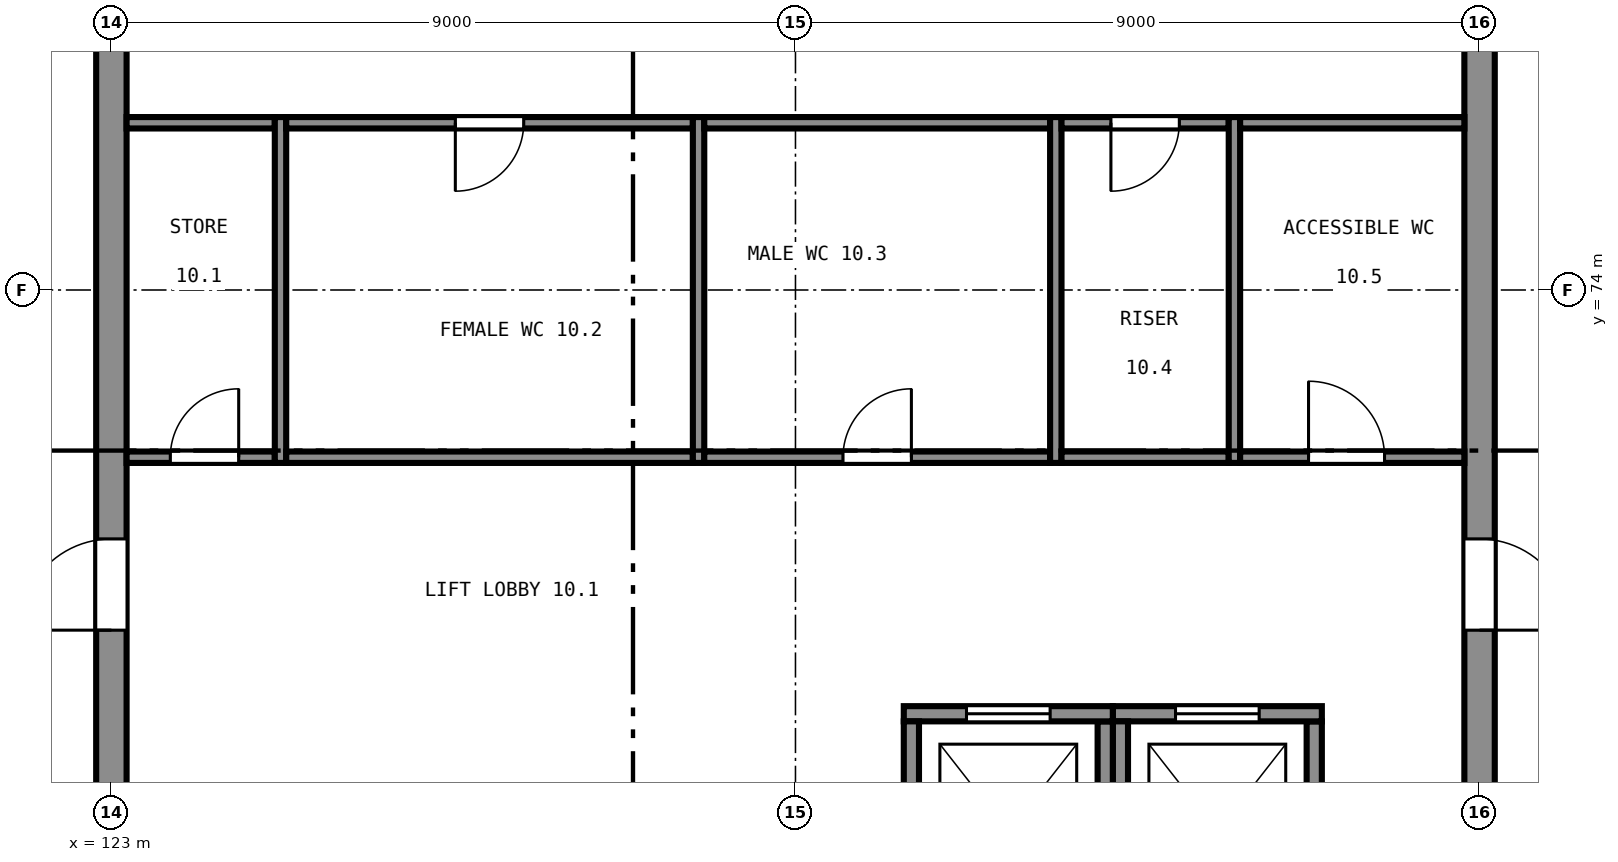
"""IFC4 building model, lengths in metres.
Left out: names, types, materials, properties, quantities, classifications, styles, units other than length and angle.
Written with IfcOpenShell. Run it as: python <this file> out.ifc"""

import sys

from ifc_helpers import new_model, si_unit, direction, frame, frame_2d, origin, place, context, subcontext, project, spatial, rectangle, extrude, element, fill, save


model = new_model("IFC4")
c1 = context("Model", 3, precision=1e-05, world=origin(), true_north=direction((0.0, 1.0)))
c2 = subcontext(c1, "Body", "Model", "MODEL_VIEW")
j1 = project(units=[si_unit("LENGTHUNIT", "METRE"), si_unit("PLANEANGLEUNIT", "RADIAN")], contexts=[c1])
p1 = place(None, origin())
s1 = spatial("IfcSite", under=j1, at=p1, CompositionType="ELEMENT")
p2 = place(p1, origin())
s2 = spatial("IfcBuilding", under=s1, at=p2, CompositionType="ELEMENT")
p3 = place(p2, frame((0.0, 0.0, 41.5)))
s3 = spatial("IfcBuildingStorey", under=s2, at=p3, CompositionType="ELEMENT", Elevation=41.5)
p4 = place(p3, frame((141.0, 65.2, 0.0), z_axis=(0.0, 0.0, 1.0), x_axis=(0.0, 1.0, 0.0)))
e1 = element("IfcWall", 1, at=p4, inside=s3, PredefinedType="SHEAR", context=c2, shape_type="SweptSolid", body=[
    extrude(rectangle(XDim=17.6, YDim=0.4, at=frame_2d((8.8, 0.0))), origin(), (0.0, 0.0, 1.0), 4.0),
])
p5 = place(p4, frame((4.325, 0.0, 0.0)))
e2 = element("IfcOpeningElement", 2, at=p5, cuts=e1, PredefinedType="OPENING", context=c2, shape_type="SweptSolid", body=[
    extrude(rectangle(XDim=1.2, YDim=2.1, at=frame_2d((0.6, 1.05))), frame((0.0, 0.21, 0.0), z_axis=(0.0, -1.0, 0.0), x_axis=(1.0, 0.0, 0.0)), (0.0, 0.0, 1.0), 0.42),
])
p6 = place(p4, frame((12.075, 0.0, 0.0)))
e3 = element("IfcOpeningElement", 3, at=p6, cuts=e1, PredefinedType="OPENING", context=c2, shape_type="SweptSolid", body=[
    extrude(rectangle(XDim=1.2, YDim=2.1, at=frame_2d((0.6, 1.05))), frame((0.0, 0.21, 0.0), z_axis=(0.0, -1.0, 0.0), x_axis=(1.0, 0.0, 0.0)), (0.0, 0.0, 1.0), 0.42),
])
p7 = place(p3, frame((123.0, 82.8, 0.0), z_axis=(0.0, 0.0, 1.0), x_axis=(0.0, -1.0, 0.0)))
e4 = element("IfcWall", 4, at=p7, inside=s3, PredefinedType="SHEAR", context=c2, shape_type="SweptSolid", body=[
    extrude(rectangle(XDim=17.6, YDim=0.4, at=frame_2d((8.8, 0.0))), origin(), (0.0, 0.0, 1.0), 4.0),
])
p8 = place(p7, frame((12.075, 0.0, 0.0)))
e5 = element("IfcOpeningElement", 5, at=p8, cuts=e4, PredefinedType="OPENING", context=c2, shape_type="SweptSolid", body=[
    extrude(rectangle(XDim=1.2, YDim=2.1, at=frame_2d((0.6, 1.05))), frame((0.0, 0.21, 0.0), z_axis=(0.0, -1.0, 0.0), x_axis=(1.0, 0.0, 0.0)), (0.0, 0.0, 1.0), 0.42),
])
p9 = place(p7, frame((4.325, 0.0, 0.0)))
e6 = element("IfcOpeningElement", 6, at=p9, cuts=e4, PredefinedType="OPENING", context=c2, shape_type="SweptSolid", body=[
    extrude(rectangle(XDim=1.2, YDim=2.1, at=frame_2d((0.6, 1.05))), frame((0.0, 0.21, 0.0), z_axis=(0.0, -1.0, 0.0), x_axis=(1.0, 0.0, 0.0)), (0.0, 0.0, 1.0), 0.42),
])
p10 = place(p3, frame((136.075, 65.425, 0.0), z_axis=(0.0, 0.0, 1.0), x_axis=(0.0, 1.0, 0.0)))
e7 = element("IfcWall", 7, at=p10, inside=s3, PredefinedType="SHEAR", context=c2, shape_type="SweptSolid", body=[
    extrude(rectangle(XDim=2.9, YDim=0.2, at=frame_2d((1.45, 0.0))), origin(), (0.0, 0.0, 1.0), 4.0),
])
p11 = place(p3, frame((136.175, 68.425, 0.0), z_axis=(0.0, 0.0, 1.0), x_axis=(-1.0, 0.0, 0.0)))
e8 = element("IfcWall", 8, at=p11, inside=s3, PredefinedType="SHEAR", context=c2, shape_type="SweptSolid", body=[
    extrude(rectangle(XDim=2.75, YDim=0.2, at=frame_2d((1.375, 0.0))), origin(), (0.0, 0.0, 1.0), 4.0),
])
p12 = place(p11, frame((0.825, 0.0, 0.0)))
e9 = element("IfcOpeningElement", 9, at=p12, cuts=e8, PredefinedType="OPENING", context=c2, shape_type="SweptSolid", body=[
    extrude(rectangle(XDim=1.1, YDim=2.1, at=frame_2d((0.55, 1.05))), frame((0.0, 0.11, 0.0), z_axis=(0.0, -1.0, 0.0), x_axis=(1.0, 0.0, 0.0)), (0.0, 0.0, 1.0), 0.22),
])
for number, where, z_axis, x_axis in (
    (10, (133.525, 68.325, 0.0), (0.0, 0.0, 1.0), (0.0, -1.0, 0.0)),
    (11, (138.825, 65.425, 0.0), (0.0, 0.0, 1.0), (0.0, 1.0, 0.0)),
):
    element("IfcWall", number, at=place(p3, frame(where, z_axis=z_axis, x_axis=x_axis)), inside=s3, PredefinedType="SHEAR", context=c2, shape_type="SweptSolid", body=[
        extrude(rectangle(XDim=2.9, YDim=0.2, at=frame_2d((1.45, 0.0))), origin(), (0.0, 0.0, 1.0), 4.0),
    ])
p13 = place(p3, frame((138.925, 68.425, 0.0), z_axis=(0.0, 0.0, 1.0), x_axis=(-1.0, 0.0, 0.0)))
e12 = element("IfcWall", 12, at=p13, inside=s3, PredefinedType="SHEAR", context=c2, shape_type="SweptSolid", body=[
    extrude(rectangle(XDim=2.75, YDim=0.2, at=frame_2d((1.375, 0.0))), origin(), (0.0, 0.0, 1.0), 4.0),
])
p14 = place(p13, frame((0.825, 0.0, 0.0)))
e13 = element("IfcOpeningElement", 13, at=p14, cuts=e12, PredefinedType="OPENING", context=c2, shape_type="SweptSolid", body=[
    extrude(rectangle(XDim=1.1, YDim=2.1, at=frame_2d((0.55, 1.05))), frame((0.0, 0.11, 0.0), z_axis=(0.0, -1.0, 0.0), x_axis=(1.0, 0.0, 0.0)), (0.0, 0.0, 1.0), 0.22),
])
p15 = place(p3, frame((136.275, 68.325, 0.0), z_axis=(0.0, 0.0, 1.0), x_axis=(0.0, -1.0, 0.0)))
e14 = element("IfcWall", 14, at=p15, inside=s3, PredefinedType="SHEAR", context=c2, shape_type="SweptSolid", body=[
    extrude(rectangle(XDim=2.9, YDim=0.2, at=frame_2d((1.45, 0.0))), origin(), (0.0, 0.0, 1.0), 4.0),
])
p16 = place(p3, frame((125.225, 71.725, 0.0), z_axis=(0.0, 0.0, 1.0), x_axis=(0.0, 1.0, 0.0)))
e15 = element("IfcWall", 15, at=p16, inside=s3, PredefinedType="PARTITIONING", context=c2, shape_type="SweptSolid", body=[
    extrude(rectangle(XDim=4.55, YDim=0.15, at=frame_2d((2.275, 0.0))), origin(), (0.0, 0.0, 1.0), 3.75),
])
p17 = place(p3, frame((123.2, 71.8, 0.0), z_axis=(0.0, 0.0, 1.0), x_axis=(1.0, 0.0, 0.0)))
e16 = element("IfcWall", 16, at=p17, inside=s3, PredefinedType="PARTITIONING", context=c2, shape_type="SweptSolid", body=[
    extrude(rectangle(XDim=1.95, YDim=0.15, at=frame_2d((0.975, 0.0))), origin(), (0.0, 0.0, 1.0), 3.75),
])
p18 = place(p17, frame((0.575, 0.0, 0.0)))
e17 = element("IfcOpeningElement", 17, at=p18, cuts=e16, PredefinedType="OPENING", context=c2, shape_type="SweptSolid", body=[
    extrude(rectangle(XDim=0.9, YDim=2.1, at=frame_2d((0.45, 1.05))), frame((0.0, 0.085, 0.0), z_axis=(0.0, -1.0, 0.0), x_axis=(1.0, 0.0, 0.0)), (0.0, 0.0, 1.0), 0.17),
])
p19 = place(p3, frame((123.2, 76.2, 0.0), z_axis=(0.0, 0.0, 1.0), x_axis=(1.0, 0.0, 0.0)))
e18 = element("IfcWall", 18, at=p19, inside=s3, PredefinedType="PARTITIONING", context=c2, shape_type="SweptSolid", body=[
    extrude(rectangle(XDim=1.95, YDim=0.15, at=frame_2d((0.975, 0.0))), origin(), (0.0, 0.0, 1.0), 3.75),
])
p20 = place(p3, frame((130.725, 71.725, 0.0), z_axis=(0.0, 0.0, 1.0), x_axis=(0.0, 1.0, 0.0)))
e19 = element("IfcWall", 19, at=p20, inside=s3, PredefinedType="PARTITIONING", context=c2, shape_type="SweptSolid", body=[
    extrude(rectangle(XDim=4.55, YDim=0.15, at=frame_2d((2.275, 0.0))), origin(), (0.0, 0.0, 1.0), 3.75),
])
p21 = place(p3, frame((125.3, 71.8, 0.0), z_axis=(0.0, 0.0, 1.0), x_axis=(1.0, 0.0, 0.0)))
e20 = element("IfcWall", 20, at=p21, inside=s3, PredefinedType="PARTITIONING", context=c2, shape_type="SweptSolid", body=[
    extrude(rectangle(XDim=5.35, YDim=0.15, at=frame_2d((2.675, 0.0))), origin(), (0.0, 0.0, 1.0), 3.75),
])
p22 = place(p3, frame((125.3, 76.2, 0.0), z_axis=(0.0, 0.0, 1.0), x_axis=(1.0, 0.0, 0.0)))
e21 = element("IfcWall", 21, at=p22, inside=s3, PredefinedType="PARTITIONING", context=c2, shape_type="SweptSolid", body=[
    extrude(rectangle(XDim=5.35, YDim=0.15, at=frame_2d((2.675, 0.0))), origin(), (0.0, 0.0, 1.0), 3.75),
])
p23 = place(p22, frame((2.225, 0.0, 0.0)))
e22 = element("IfcOpeningElement", 22, at=p23, cuts=e21, PredefinedType="OPENING", context=c2, shape_type="SweptSolid", body=[
    extrude(rectangle(XDim=0.9, YDim=2.1, at=frame_2d((0.45, 1.05))), frame((0.0, 0.085, 0.0), z_axis=(0.0, -1.0, 0.0), x_axis=(1.0, 0.0, 0.0)), (0.0, 0.0, 1.0), 0.17),
])
p24 = place(p3, frame((135.425, 71.725, 0.0), z_axis=(0.0, 0.0, 1.0), x_axis=(0.0, 1.0, 0.0)))
e23 = element("IfcWall", 23, at=p24, inside=s3, PredefinedType="PARTITIONING", context=c2, shape_type="SweptSolid", body=[
    extrude(rectangle(XDim=4.55, YDim=0.15, at=frame_2d((2.275, 0.0))), origin(), (0.0, 0.0, 1.0), 3.75),
])
p25 = place(p3, frame((130.8, 71.8, 0.0), z_axis=(0.0, 0.0, 1.0), x_axis=(1.0, 0.0, 0.0)))
e24 = element("IfcWall", 24, at=p25, inside=s3, PredefinedType="PARTITIONING", context=c2, shape_type="SweptSolid", body=[
    extrude(rectangle(XDim=4.55, YDim=0.15, at=frame_2d((2.275, 0.0))), origin(), (0.0, 0.0, 1.0), 3.75),
])
p26 = place(p25, frame((1.825, 0.0, 0.0)))
e25 = element("IfcOpeningElement", 25, at=p26, cuts=e24, PredefinedType="OPENING", context=c2, shape_type="SweptSolid", body=[
    extrude(rectangle(XDim=0.9, YDim=2.1, at=frame_2d((0.45, 1.05))), frame((0.0, 0.085, 0.0), z_axis=(0.0, -1.0, 0.0), x_axis=(1.0, 0.0, 0.0)), (0.0, 0.0, 1.0), 0.17),
])
p27 = place(p3, frame((130.8, 76.2, 0.0), z_axis=(0.0, 0.0, 1.0), x_axis=(1.0, 0.0, 0.0)))
e26 = element("IfcWall", 26, at=p27, inside=s3, PredefinedType="PARTITIONING", context=c2, shape_type="SweptSolid", body=[
    extrude(rectangle(XDim=4.55, YDim=0.15, at=frame_2d((2.275, 0.0))), origin(), (0.0, 0.0, 1.0), 3.75),
])
p28 = place(p3, frame((137.775, 71.725, 0.0), z_axis=(0.0, 0.0, 1.0), x_axis=(0.0, 1.0, 0.0)))
e27 = element("IfcWall", 27, at=p28, inside=s3, PredefinedType="PARTITIONING", context=c2, shape_type="SweptSolid", body=[
    extrude(rectangle(XDim=4.55, YDim=0.15, at=frame_2d((2.275, 0.0))), origin(), (0.0, 0.0, 1.0), 3.75),
])
p29 = place(p3, frame((135.5, 71.8, 0.0), z_axis=(0.0, 0.0, 1.0), x_axis=(1.0, 0.0, 0.0)))
e28 = element("IfcWall", 28, at=p29, inside=s3, PredefinedType="PARTITIONING", context=c2, shape_type="SweptSolid", body=[
    extrude(rectangle(XDim=2.2, YDim=0.15, at=frame_2d((1.1, 0.0))), origin(), (0.0, 0.0, 1.0), 3.75),
])
p30 = place(p3, frame((135.5, 76.2, 0.0), z_axis=(0.0, 0.0, 1.0), x_axis=(1.0, 0.0, 0.0)))
e29 = element("IfcWall", 29, at=p30, inside=s3, PredefinedType="PARTITIONING", context=c2, shape_type="SweptSolid", body=[
    extrude(rectangle(XDim=2.2, YDim=0.15, at=frame_2d((1.1, 0.0))), origin(), (0.0, 0.0, 1.0), 3.75),
])
p31 = place(p30, frame((0.65, 0.0, 0.0)))
e30 = element("IfcOpeningElement", 30, at=p31, cuts=e29, PredefinedType="OPENING", context=c2, shape_type="SweptSolid", body=[
    extrude(rectangle(XDim=0.9, YDim=2.1, at=frame_2d((0.45, 1.05))), frame((0.0, 0.085, 0.0), z_axis=(0.0, -1.0, 0.0), x_axis=(1.0, 0.0, 0.0)), (0.0, 0.0, 1.0), 0.17),
])
p32 = place(p3, frame((137.85, 71.8, 0.0), z_axis=(0.0, 0.0, 1.0), x_axis=(1.0, 0.0, 0.0)))
e31 = element("IfcWall", 31, at=p32, inside=s3, PredefinedType="PARTITIONING", context=c2, shape_type="SweptSolid", body=[
    extrude(rectangle(XDim=2.95, YDim=0.15, at=frame_2d((1.475, 0.0))), origin(), (0.0, 0.0, 1.0), 3.75),
])
p33 = place(p32, frame((0.9, 0.0, 0.0)))
e32 = element("IfcOpeningElement", 32, at=p33, cuts=e31, PredefinedType="OPENING", context=c2, shape_type="SweptSolid", body=[
    extrude(rectangle(XDim=1.0, YDim=2.1, at=frame_2d((0.5, 1.05))), frame((0.0, 0.085, 0.0), z_axis=(0.0, -1.0, 0.0), x_axis=(1.0, 0.0, 0.0)), (0.0, 0.0, 1.0), 0.17),
])
p34 = place(p3, frame((137.85, 76.2, 0.0), z_axis=(0.0, 0.0, 1.0), x_axis=(1.0, 0.0, 0.0)))
e33 = element("IfcWall", 33, at=p34, inside=s3, PredefinedType="PARTITIONING", context=c2, shape_type="SweptSolid", body=[
    extrude(rectangle(XDim=2.95, YDim=0.15, at=frame_2d((1.475, 0.0))), origin(), (0.0, 0.0, 1.0), 3.75),
])
p35 = place(p12, origin())
e34 = element("IfcDoor", 34, at=p35, inside=s3, OperationType="SLIDING_TO_LEFT", PredefinedType="DOOR", context=c2, shape_type="SweptSolid", body=[
    extrude(rectangle(XDim=1.1, YDim=2.1, at=frame_2d((0.55, 1.05))), frame((0.0, 0.025, 0.0), z_axis=(0.0, -1.0, 0.0), x_axis=(1.0, 0.0, 0.0)), (0.0, 0.0, 1.0), 0.05),
])
fill(e9, e34)
p36 = place(p14, origin())
e35 = element("IfcDoor", 35, at=p36, inside=s3, OperationType="SLIDING_TO_LEFT", PredefinedType="DOOR", context=c2, shape_type="SweptSolid", body=[
    extrude(rectangle(XDim=1.1, YDim=2.1, at=frame_2d((0.55, 1.05))), frame((0.0, 0.025, 0.0), z_axis=(0.0, -1.0, 0.0), x_axis=(1.0, 0.0, 0.0)), (0.0, 0.0, 1.0), 0.05),
])
fill(e13, e35)
p37 = place(p8, frame((1.2, 0.0, 0.0), z_axis=(0.0, 0.0, 1.0), x_axis=(-1.0, 0.0, 0.0)))
e36 = element("IfcDoor", 36, at=p37, inside=s3, OperationType="SINGLE_SWING_RIGHT", PredefinedType="DOOR", context=c2, shape_type="SweptSolid", body=[
    extrude(rectangle(XDim=1.2, YDim=2.1, at=frame_2d((0.6, 1.05))), frame((0.0, 0.025, 0.0), z_axis=(0.0, -1.0, 0.0), x_axis=(1.0, 0.0, 0.0)), (0.0, 0.0, 1.0), 0.05),
])
fill(e5, e36)
p38 = place(p5, frame((1.2, 0.0, 0.0), z_axis=(0.0, 0.0, 1.0), x_axis=(-1.0, 0.0, 0.0)))
e37 = element("IfcDoor", 37, at=p38, inside=s3, OperationType="SINGLE_SWING_LEFT", PredefinedType="DOOR", context=c2, shape_type="SweptSolid", body=[
    extrude(rectangle(XDim=1.2, YDim=2.1, at=frame_2d((0.6, 1.05))), frame((0.0, 0.025, 0.0), z_axis=(0.0, -1.0, 0.0), x_axis=(1.0, 0.0, 0.0)), (0.0, 0.0, 1.0), 0.05),
])
fill(e2, e37)
p39 = place(p18, origin())
e38 = element("IfcDoor", 38, at=p39, inside=s3, OperationType="SINGLE_SWING_LEFT", PredefinedType="DOOR", context=c2, shape_type="SweptSolid", body=[
    extrude(rectangle(XDim=0.9, YDim=2.1, at=frame_2d((0.45, 1.05))), frame((0.0, 0.025, 0.0), z_axis=(0.0, -1.0, 0.0), x_axis=(1.0, 0.0, 0.0)), (0.0, 0.0, 1.0), 0.05),
])
fill(e17, e38)
p40 = place(p23, frame((0.9, 0.0, 0.0), z_axis=(0.0, 0.0, 1.0), x_axis=(-1.0, 0.0, 0.0)))
e39 = element("IfcDoor", 39, at=p40, inside=s3, OperationType="SINGLE_SWING_LEFT", PredefinedType="DOOR", context=c2, shape_type="SweptSolid", body=[
    extrude(rectangle(XDim=0.9, YDim=2.1, at=frame_2d((0.45, 1.05))), frame((0.0, 0.025, 0.0), z_axis=(0.0, -1.0, 0.0), x_axis=(1.0, 0.0, 0.0)), (0.0, 0.0, 1.0), 0.05),
])
fill(e22, e39)
p41 = place(p26, origin())
e40 = element("IfcDoor", 40, at=p41, inside=s3, OperationType="SINGLE_SWING_LEFT", PredefinedType="DOOR", context=c2, shape_type="SweptSolid", body=[
    extrude(rectangle(XDim=0.9, YDim=2.1, at=frame_2d((0.45, 1.05))), frame((0.0, 0.025, 0.0), z_axis=(0.0, -1.0, 0.0), x_axis=(1.0, 0.0, 0.0)), (0.0, 0.0, 1.0), 0.05),
])
fill(e25, e40)
p42 = place(p31, frame((0.9, 0.0, 0.0), z_axis=(0.0, 0.0, 1.0), x_axis=(-1.0, 0.0, 0.0)))
e41 = element("IfcDoor", 41, at=p42, inside=s3, OperationType="SINGLE_SWING_LEFT", PredefinedType="DOOR", context=c2, shape_type="SweptSolid", body=[
    extrude(rectangle(XDim=0.9, YDim=2.1, at=frame_2d((0.45, 1.05))), frame((0.0, 0.025, 0.0), z_axis=(0.0, -1.0, 0.0), x_axis=(1.0, 0.0, 0.0)), (0.0, 0.0, 1.0), 0.05),
])
fill(e30, e41)
p43 = place(p33, origin())
e42 = element("IfcDoor", 42, at=p43, inside=s3, OperationType="SINGLE_SWING_RIGHT", PredefinedType="DOOR", context=c2, shape_type="SweptSolid", body=[
    extrude(rectangle(XDim=1.0, YDim=2.1, at=frame_2d((0.5, 1.05))), frame((0.0, 0.025, 0.0), z_axis=(0.0, -1.0, 0.0), x_axis=(1.0, 0.0, 0.0)), (0.0, 0.0, 1.0), 0.05),
])
fill(e32, e42)
save(model, sys.argv[1])
